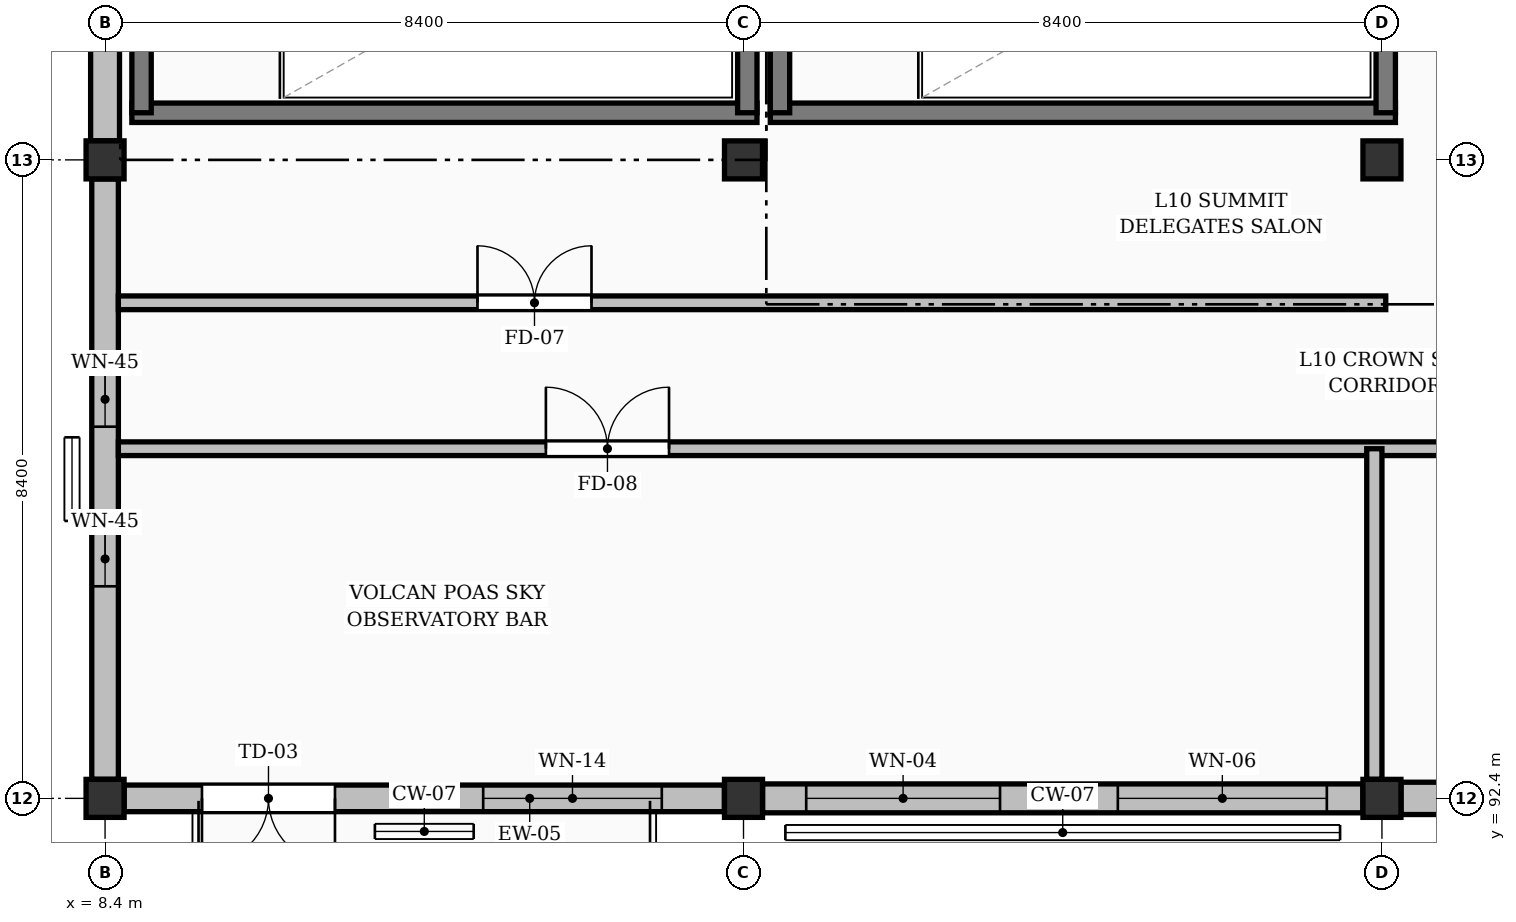
"""IFC4 building model, lengths in metres.
Left out: names, types, materials, properties, quantities, classifications, styles, units other than length and angle.
Written with IfcOpenShell. Run it as: python <this file> out.ifc"""

import sys

from ifc_helpers import new_model, si_unit, direction, frame, frame_2d, origin, origin_2d, place, context, subcontext, project, spatial, rectangle, extrude, element, fill, save


model = new_model("IFC4")
c1 = context("Model", 3, precision=1e-05, world=origin(), true_north=direction((0.0, 1.0)))
c2 = subcontext(c1, "Body", "Model", "MODEL_VIEW")
j1 = project(units=[si_unit("LENGTHUNIT", "METRE"), si_unit("PLANEANGLEUNIT", "RADIAN")], contexts=[c1])
p1 = place(None, origin())
s1 = spatial("IfcSite", under=j1, at=p1, CompositionType="ELEMENT")
p2 = place(p1, origin())
s2 = spatial("IfcBuilding", under=s1, at=p2, CompositionType="ELEMENT")
p3 = place(p2, frame((0.0, 0.0, 35.28)))
s3 = spatial("IfcBuildingStorey", under=s2, at=p3, CompositionType="ELEMENT", Elevation=35.28)
for number, where, z_axis, x_axis in (
    (1, (8.4, 92.4, 0.0), (0.0, 0.0, 1.0), (1.0, 0.0, 0.0)),
    (2, (8.4, 100.8, 0.0), (0.0, 0.0, 1.0), (1.0, 0.0, 0.0)),
    (3, (16.8, 92.4, 0.0), (0.0, 0.0, 1.0), (1.0, 0.0, 0.0)),
    (4, (16.8, 100.8, 0.0), (0.0, 0.0, 1.0), (1.0, 0.0, 0.0)),
    (5, (25.2, 92.4, 0.0), (0.0, 0.0, 1.0), (1.0, 0.0, 0.0)),
    (6, (25.2, 100.8, 0.0), (0.0, 0.0, 1.0), (1.0, 0.0, 0.0)),
):
    element("IfcColumn", number, at=place(p3, frame(where, z_axis=z_axis, x_axis=x_axis)), inside=s3, PredefinedType="COLUMN", context=c2, shape_type="SweptSolid", body=[
        extrude(rectangle(XDim=0.5, YDim=0.5, at=origin_2d()), origin(), (0.0, 0.0, 1.0), 3.36),
    ])
p4 = place(p3, frame((8.651, 92.4, 0.0), z_axis=(0.0, 0.0, 1.0), x_axis=(1.0, 0.0, 0.0)))
e7 = element("IfcWall", 7, at=p4, inside=s3, PredefinedType="SOLIDWALL", context=c2, shape_type="SweptSolid", body=[
    extrude(rectangle(XDim=7.898, YDim=0.35, at=frame_2d((3.949, 0.0))), origin(), (0.0, 0.0, 1.0), 2.514),
])
p5 = place(p4, frame((1.024, 0.0, 0.0)))
e8 = element("IfcOpeningElement", 8, at=p5, cuts=e7, PredefinedType="OPENING", context=c2, shape_type="SweptSolid", body=[
    extrude(rectangle(XDim=1.75, YDim=2.08, at=frame_2d((0.875, 1.04))), frame((0.0, 0.185, 0.0), z_axis=(0.0, -1.0, 0.0), x_axis=(1.0, 0.0, 0.0)), (0.0, 0.0, 1.0), 0.37),
])
p6 = place(p4, frame((4.724, 0.0, 0.25)))
e9 = element("IfcOpeningElement", 9, at=p6, cuts=e7, PredefinedType="OPENING", context=c2, shape_type="SweptSolid", body=[
    extrude(rectangle(XDim=2.35, YDim=2.05, at=frame_2d((1.175, 1.025))), frame((0.0, 0.185, 0.0), z_axis=(0.0, -1.0, 0.0), x_axis=(1.0, 0.0, 0.0)), (0.0, 0.0, 1.0), 0.37),
])
p7 = place(p3, frame((17.051, 92.4, 0.0), z_axis=(0.0, 0.0, 1.0), x_axis=(1.0, 0.0, 0.0)))
e10 = element("IfcWall", 10, at=p7, inside=s3, PredefinedType="SOLIDWALL", context=c2, shape_type="SweptSolid", body=[
    extrude(rectangle(XDim=7.898, YDim=0.38, at=frame_2d((3.949, 0.0))), origin(), (0.0, 0.0, 1.0), 2.514),
])
p8 = place(p7, frame((0.574, 0.0, 0.25)))
e11 = element("IfcOpeningElement", 11, at=p8, cuts=e10, PredefinedType="OPENING", context=c2, shape_type="SweptSolid", body=[
    extrude(rectangle(XDim=2.55, YDim=1.85, at=frame_2d((1.275, 0.925))), frame((0.0, 0.2, 0.0), z_axis=(0.0, -1.0, 0.0), x_axis=(1.0, 0.0, 0.0)), (0.0, 0.0, 1.0), 0.4),
])
p9 = place(p7, frame((4.674, 0.0, 0.25)))
e12 = element("IfcOpeningElement", 12, at=p9, cuts=e10, PredefinedType="OPENING", context=c2, shape_type="SweptSolid", body=[
    extrude(rectangle(XDim=2.75, YDim=1.85, at=frame_2d((1.375, 0.925))), frame((0.0, 0.2, 0.0), z_axis=(0.0, -1.0, 0.0), x_axis=(1.0, 0.0, 0.0)), (0.0, 0.0, 1.0), 0.4),
])
p10 = place(p3, frame((25.451, 92.4, 0.0), z_axis=(0.0, 0.0, 1.0), x_axis=(1.0, 0.0, 0.0)))
e13 = element("IfcWall", 13, at=p10, inside=s3, PredefinedType="SOLIDWALL", context=c2, shape_type="SweptSolid", body=[
    extrude(rectangle(XDim=7.898, YDim=0.425, at=frame_2d((3.949, 0.0))), origin(), (0.0, 0.0, 1.0), 2.514),
])
p11 = place(p10, frame((1.124, 0.0, 0.0)))
e14 = element("IfcOpeningElement", 14, at=p11, cuts=e13, PredefinedType="OPENING", context=c2, shape_type="SweptSolid", body=[
    extrude(rectangle(XDim=1.55, YDim=2.08, at=frame_2d((0.775, 1.04))), frame((0.0, 0.223, 0.0), z_axis=(0.0, -1.0, 0.0), x_axis=(1.0, 0.0, 0.0)), (0.0, 0.0, 1.0), 0.445),
])
p12 = place(p10, frame((4.789, 0.0, 0.25)))
e15 = element("IfcOpeningElement", 15, at=p12, cuts=e13, PredefinedType="OPENING", context=c2, shape_type="SweptSolid", body=[
    extrude(rectangle(XDim=2.22, YDim=1.9, at=frame_2d((1.11, 0.95))), frame((0.0, 0.223, 0.0), z_axis=(0.0, -1.0, 0.0), x_axis=(1.0, 0.0, 0.0)), (0.0, 0.0, 1.0), 0.445),
])
p13 = place(p3, frame((8.4, 92.651, 0.0), z_axis=(0.0, 0.0, 1.0), x_axis=(0.0, 1.0, 0.0)))
e16 = element("IfcWall", 16, at=p13, inside=s3, PredefinedType="SOLIDWALL", context=c2, shape_type="SweptSolid", body=[
    extrude(rectangle(XDim=7.898, YDim=0.35, at=frame_2d((3.949, 0.0))), origin(), (0.0, 0.0, 1.0), 2.514),
])
p14 = place(p13, frame((2.539, 0.0, 0.3)))
e17 = element("IfcOpeningElement", 17, at=p14, cuts=e16, PredefinedType="OPENING", context=c2, shape_type="SweptSolid", body=[
    extrude(rectangle(XDim=0.72, YDim=1.85, at=frame_2d((0.36, 0.925))), frame((0.0, 0.185, 0.0), z_axis=(0.0, -1.0, 0.0), x_axis=(1.0, 0.0, 0.0)), (0.0, 0.0, 1.0), 0.37),
])
p15 = place(p13, frame((4.639, 0.0, 0.3)))
e18 = element("IfcOpeningElement", 18, at=p15, cuts=e16, PredefinedType="OPENING", context=c2, shape_type="SweptSolid", body=[
    extrude(rectangle(XDim=0.72, YDim=1.85, at=frame_2d((0.36, 0.925))), frame((0.0, 0.185, 0.0), z_axis=(0.0, -1.0, 0.0), x_axis=(1.0, 0.0, 0.0)), (0.0, 0.0, 1.0), 0.37),
])
p16 = place(p3, frame((8.4, 101.051, 0.0), z_axis=(0.0, 0.0, 1.0), x_axis=(0.0, 1.0, 0.0)))
e19 = element("IfcWall", 19, at=p16, inside=s3, PredefinedType="SOLIDWALL", context=c2, shape_type="SweptSolid", body=[
    extrude(rectangle(XDim=7.898, YDim=0.38, at=frame_2d((3.949, 0.0))), origin(), (0.0, 0.0, 1.0), 2.514),
])
p17 = place(p16, frame((2.449, 0.0, 0.3)))
e20 = element("IfcOpeningElement", 20, at=p17, cuts=e19, PredefinedType="OPENING", context=c2, shape_type="SweptSolid", body=[
    extrude(rectangle(XDim=0.9, YDim=1.85, at=frame_2d((0.45, 0.925))), frame((0.0, 0.2, 0.0), z_axis=(0.0, -1.0, 0.0), x_axis=(1.0, 0.0, 0.0)), (0.0, 0.0, 1.0), 0.4),
])
p18 = place(p16, frame((4.549, 0.0, 0.3)))
e21 = element("IfcOpeningElement", 21, at=p18, cuts=e19, PredefinedType="OPENING", context=c2, shape_type="SweptSolid", body=[
    extrude(rectangle(XDim=0.9, YDim=1.85, at=frame_2d((0.45, 0.925))), frame((0.0, 0.2, 0.0), z_axis=(0.0, -1.0, 0.0), x_axis=(1.0, 0.0, 0.0)), (0.0, 0.0, 1.0), 0.4),
])
p19 = place(p3, frame((8.752, 101.42, 0.0), z_axis=(0.0, 0.0, 1.0), x_axis=(1.0, 0.0, 0.0)))
e22 = element("IfcWall", 22, at=p19, inside=s3, PredefinedType="SOLIDWALL", context=c2, shape_type="SweptSolid", body=[
    extrude(rectangle(XDim=8.225, YDim=0.255, at=frame_2d((4.113, 0.0))), origin(), (0.0, 0.0, 1.0), 3.14),
])
for number, where, z_axis, x_axis in (
    (23, (8.88, 101.42, 0.0), (0.0, 0.0, 1.0), (0.0, 1.0, 0.0)),
    (24, (16.85, 101.42, 0.0), (0.0, 0.0, 1.0), (0.0, 1.0, 0.0)),
):
    element("IfcWall", number, at=place(p3, frame(where, z_axis=z_axis, x_axis=x_axis)), inside=s3, PredefinedType="SOLIDWALL", context=c2, shape_type="SweptSolid", body=[
        extrude(rectangle(XDim=3.73, YDim=0.255, at=frame_2d((1.865, 0.0))), origin(), (0.0, 0.0, 1.0), 3.14),
    ])
p20 = place(p3, frame((17.153, 101.42, 0.0), z_axis=(0.0, 0.0, 1.0), x_axis=(1.0, 0.0, 0.0)))
e25 = element("IfcWall", 25, at=p20, inside=s3, PredefinedType="SOLIDWALL", context=c2, shape_type="SweptSolid", body=[
    extrude(rectangle(XDim=8.225, YDim=0.255, at=frame_2d((4.112, 0.0))), origin(), (0.0, 0.0, 1.0), 3.14),
])
for number, where, z_axis, x_axis in (
    (26, (17.28, 101.42, 0.0), (0.0, 0.0, 1.0), (0.0, 1.0, 0.0)),
    (27, (25.25, 101.42, 0.0), (0.0, 0.0, 1.0), (0.0, 1.0, 0.0)),
):
    element("IfcWall", number, at=place(p3, frame(where, z_axis=z_axis, x_axis=x_axis)), inside=s3, PredefinedType="SOLIDWALL", context=c2, shape_type="SweptSolid", body=[
        extrude(rectangle(XDim=3.73, YDim=0.255, at=frame_2d((1.865, 0.0))), origin(), (0.0, 0.0, 1.0), 3.14),
    ])
p21 = place(p3, frame((8.575, 97.0, 0.0), z_axis=(0.0, 0.0, 1.0), x_axis=(1.0, 0.0, 0.0)))
e28 = element("IfcWall", 28, at=p21, inside=s3, PredefinedType="PARTITIONING", context=c2, shape_type="SweptSolid", body=[
    extrude(rectangle(XDim=41.65, YDim=0.18, at=frame_2d((20.825, 0.0))), origin(), (0.0, 0.0, 1.0), 3.14),
])
p22 = place(p21, frame((5.625, 0.0, 0.0)))
e29 = element("IfcOpeningElement", 29, at=p22, cuts=e28, PredefinedType="OPENING", context=c2, shape_type="SweptSolid", body=[
    extrude(rectangle(XDim=1.62, YDim=2.2, at=frame_2d((0.81, 1.1))), frame((0.0, 0.1, 0.0), z_axis=(0.0, -1.0, 0.0), x_axis=(1.0, 0.0, 0.0)), (0.0, 0.0, 1.0), 0.2),
])
p23 = place(p21, frame((19.625, 0.0, 0.0)))
e30 = element("IfcOpeningElement", 30, at=p23, cuts=e28, PredefinedType="OPENING", context=c2, shape_type="SweptSolid", body=[
    extrude(rectangle(XDim=1.1, YDim=2.1, at=frame_2d((0.55, 1.05))), frame((0.0, 0.1, 0.0), z_axis=(0.0, -1.0, 0.0), x_axis=(1.0, 0.0, 0.0)), (0.0, 0.0, 1.0), 0.2),
])
p24 = place(p21, frame((29.625, 0.0, 0.0)))
e31 = element("IfcOpeningElement", 31, at=p24, cuts=e28, PredefinedType="OPENING", context=c2, shape_type="SweptSolid", body=[
    extrude(rectangle(XDim=1.62, YDim=2.2, at=frame_2d((0.81, 1.1))), frame((0.0, 0.1, 0.0), z_axis=(0.0, -1.0, 0.0), x_axis=(1.0, 0.0, 0.0)), (0.0, 0.0, 1.0), 0.2),
])
p25 = place(p3, frame((25.1, 92.65, 0.0), z_axis=(0.0, 0.0, 1.0), x_axis=(0.0, 1.0, 0.0)))
e32 = element("IfcWall", 32, at=p25, inside=s3, PredefinedType="SOLIDWALL", context=c2, shape_type="SweptSolid", body=[
    extrude(rectangle(XDim=4.35, YDim=0.2, at=frame_2d((2.175, 0.0))), origin(), (0.0, 0.0, 1.0), 2.514),
])
p26 = place(p3, frame((8.575, 98.92, 0.0), z_axis=(0.0, 0.0, 1.0), x_axis=(1.0, 0.0, 0.0)))
e33 = element("IfcWall", 33, at=p26, inside=s3, PredefinedType="PARTITIONING", context=c2, shape_type="SweptSolid", body=[
    extrude(rectangle(XDim=16.675, YDim=0.18, at=frame_2d((8.337, 0.0))), origin(), (0.0, 0.0, 1.0), 3.14),
])
p27 = place(p26, frame((4.725, 0.0, 0.0)))
e34 = element("IfcOpeningElement", 34, at=p27, cuts=e33, PredefinedType="OPENING", context=c2, shape_type="SweptSolid", body=[
    extrude(rectangle(XDim=1.5, YDim=2.2, at=frame_2d((0.75, 1.1))), frame((0.0, 0.1, 0.0), z_axis=(0.0, -1.0, 0.0), x_axis=(1.0, 0.0, 0.0)), (0.0, 0.0, 1.0), 0.2),
])
p28 = place(p5, frame((1.75, 0.0, 0.0), z_axis=(0.0, 0.0, 1.0), x_axis=(-1.0, 0.0, 0.0)))
e35 = element("IfcDoor", 35, at=p28, inside=s3, OperationType="DOUBLE_DOOR_SINGLE_SWING", PredefinedType="DOOR", context=c2, shape_type="SweptSolid", body=[
    extrude(rectangle(XDim=1.75, YDim=2.08, at=frame_2d((0.875, 1.04))), frame((0.0, 0.025, 0.0), z_axis=(0.0, -1.0, 0.0), x_axis=(1.0, 0.0, 0.0)), (0.0, 0.0, 1.0), 0.05),
])
fill(e8, e35)
p29 = place(p6, origin())
e36 = element("IfcWindow", 36, at=p29, inside=s3, PartitioningType="DOUBLE_PANEL_VERTICAL", PredefinedType="WINDOW", context=c2, shape_type="SweptSolid", body=[
    extrude(rectangle(XDim=2.35, YDim=2.05, at=frame_2d((1.175, 1.025))), frame((0.0, 0.03, 0.0), z_axis=(0.0, -1.0, 0.0), x_axis=(1.0, 0.0, 0.0)), (0.0, 0.0, 1.0), 0.06),
])
fill(e9, e36)
p30 = place(p8, origin())
e37 = element("IfcWindow", 37, at=p30, inside=s3, PartitioningType="DOUBLE_PANEL_VERTICAL", PredefinedType="WINDOW", context=c2, shape_type="SweptSolid", body=[
    extrude(rectangle(XDim=2.55, YDim=1.85, at=frame_2d((1.275, 0.925))), frame((0.0, 0.03, 0.0), z_axis=(0.0, -1.0, 0.0), x_axis=(1.0, 0.0, 0.0)), (0.0, 0.0, 1.0), 0.06),
])
fill(e11, e37)
p31 = place(p9, origin())
e38 = element("IfcWindow", 38, at=p31, inside=s3, PartitioningType="DOUBLE_PANEL_VERTICAL", PredefinedType="WINDOW", context=c2, shape_type="SweptSolid", body=[
    extrude(rectangle(XDim=2.75, YDim=1.85, at=frame_2d((1.375, 0.925))), frame((0.0, 0.03, 0.0), z_axis=(0.0, -1.0, 0.0), x_axis=(1.0, 0.0, 0.0)), (0.0, 0.0, 1.0), 0.06),
])
fill(e12, e38)
p32 = place(p14, origin())
e39 = element("IfcWindow", 39, at=p32, inside=s3, PartitioningType="SINGLE_PANEL", PredefinedType="WINDOW", context=c2, shape_type="SweptSolid", body=[
    extrude(rectangle(XDim=0.72, YDim=1.85, at=frame_2d((0.36, 0.925))), frame((0.0, 0.03, 0.0), z_axis=(0.0, -1.0, 0.0), x_axis=(1.0, 0.0, 0.0)), (0.0, 0.0, 1.0), 0.06),
])
fill(e17, e39)
p33 = place(p15, origin())
e40 = element("IfcWindow", 40, at=p33, inside=s3, PartitioningType="SINGLE_PANEL", PredefinedType="WINDOW", context=c2, shape_type="SweptSolid", body=[
    extrude(rectangle(XDim=0.72, YDim=1.85, at=frame_2d((0.36, 0.925))), frame((0.0, 0.03, 0.0), z_axis=(0.0, -1.0, 0.0), x_axis=(1.0, 0.0, 0.0)), (0.0, 0.0, 1.0), 0.06),
])
fill(e18, e40)
p34 = place(p22, origin())
e41 = element("IfcDoor", 41, at=p34, inside=s3, OperationType="DOUBLE_DOOR_SINGLE_SWING", PredefinedType="DOOR", context=c2, shape_type="SweptSolid", body=[
    extrude(rectangle(XDim=1.62, YDim=2.2, at=frame_2d((0.81, 1.1))), frame((0.0, 0.025, 0.0), z_axis=(0.0, -1.0, 0.0), x_axis=(1.0, 0.0, 0.0)), (0.0, 0.0, 1.0), 0.05),
])
fill(e29, e41)
p35 = place(p27, origin())
e42 = element("IfcDoor", 42, at=p35, inside=s3, OperationType="DOUBLE_DOOR_SINGLE_SWING", PredefinedType="DOOR", context=c2, shape_type="SweptSolid", body=[
    extrude(rectangle(XDim=1.5, YDim=2.2, at=frame_2d((0.75, 1.1))), frame((0.0, 0.025, 0.0), z_axis=(0.0, -1.0, 0.0), x_axis=(1.0, 0.0, 0.0)), (0.0, 0.0, 1.0), 0.05),
])
fill(e34, e42)
save(model, sys.argv[1])
